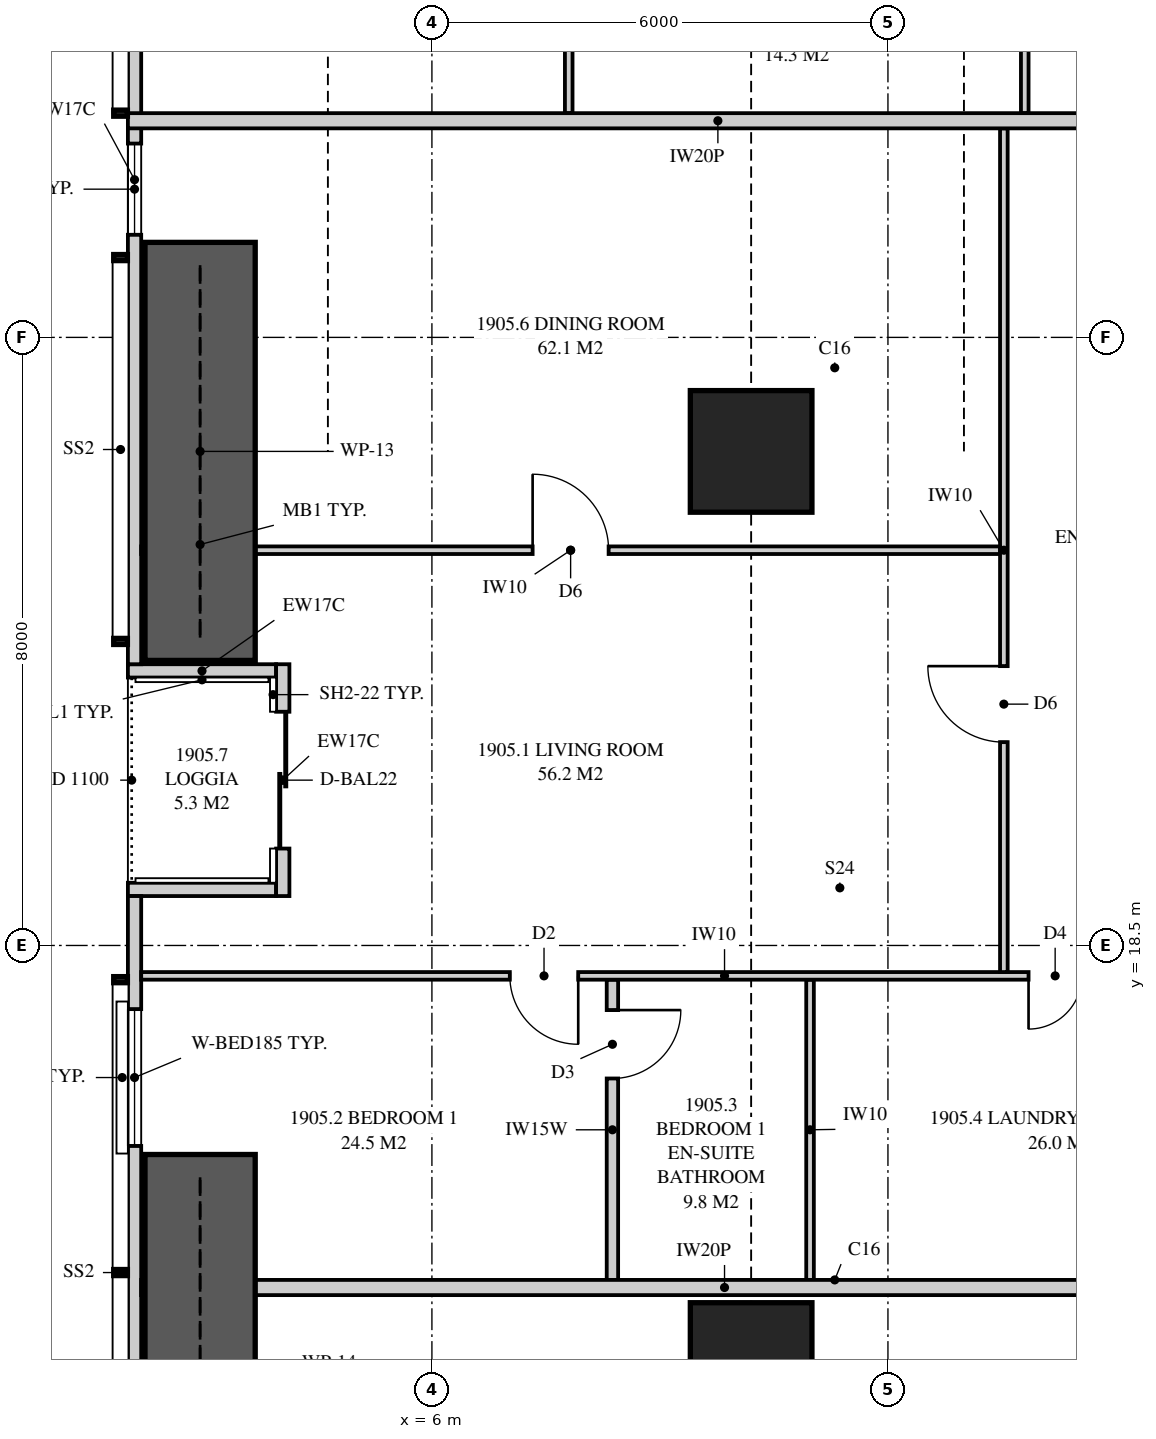
"""IFC4 building model, lengths in metres.
Left out: names, types, materials, properties, quantities, classifications, styles, units other than length and angle.
Written with IfcOpenShell. Run it as: python <this file> out.ifc"""

import sys

from ifc_helpers import new_model, si_unit, direction, frame, frame_2d, origin, origin_2d, place, context, subcontext, project, spatial, polyline, rectangle, outline, extrude, element, fill, save


model = new_model("IFC4")
c1 = context("Model", 3, precision=1e-05, world=origin(), true_north=direction((0.0, 1.0)))
c2 = subcontext(c1, "Body", "Model", "MODEL_VIEW")
j1 = project(units=[si_unit("LENGTHUNIT", "METRE"), si_unit("PLANEANGLEUNIT", "RADIAN")], contexts=[c1])
p1 = place(None, origin())
s1 = spatial("IfcSite", under=j1, at=p1, CompositionType="ELEMENT")
p2 = place(p1, origin())
s2 = spatial("IfcBuilding", under=s1, at=p2, CompositionType="ELEMENT")
p3 = place(p2, frame((0.0, 0.0, 71.25)))
s3 = spatial("IfcBuildingStorey", under=s2, at=p3, CompositionType="ELEMENT", Elevation=71.25)
for number, where, z_axis, x_axis in (
    (1, (10.2, 13.0, 0.0), (0.0, 0.0, 1.0), (1.0, 0.0, 0.0)),
    (2, (10.2, 25.0, 0.0), (0.0, 0.0, 1.0), (1.0, 0.0, 0.0)),
):
    element("IfcColumn", number, at=place(p3, frame(where, z_axis=z_axis, x_axis=x_axis)), inside=s3, PredefinedType="COLUMN", context=c2, shape_type="SweptSolid", body=[
        extrude(rectangle(XDim=1.6, YDim=1.6, at=origin_2d()), origin(), (0.0, 0.0, 1.0), 3.5),
    ])
p4 = place(p3, frame((2.087, 34.949, 0.0), z_axis=(0.0, 0.0, 1.0), x_axis=(0.0, -1.0, 0.0)))
e3 = element("IfcWall", 3, at=p4, inside=s3, PredefinedType="SOLIDWALL", context=c2, shape_type="SweptSolid", body=[
    extrude(rectangle(XDim=12.749, YDim=0.175, at=frame_2d((6.375, 0.0))), origin(), (0.0, 0.0, 1.0), 3.22),
])
p5 = place(p4, frame((2.704, 0.0, 0.4)))
e4 = element("IfcOpeningElement", 4, at=p5, cuts=e3, PredefinedType="OPENING", context=c2, shape_type="SweptSolid", body=[
    extrude(rectangle(XDim=1.8, YDim=1.85, at=frame_2d((0.9, 0.925))), frame((0.0, 0.097, 0.0), z_axis=(0.0, -1.0, 0.0), x_axis=(1.0, 0.0, 0.0)), (0.0, 0.0, 1.0), 0.195),
])
p6 = place(p4, frame((5.899, 0.0, 0.4)))
e5 = element("IfcOpeningElement", 5, at=p6, cuts=e3, PredefinedType="OPENING", context=c2, shape_type="SweptSolid", body=[
    extrude(rectangle(XDim=1.2, YDim=1.85, at=frame_2d((0.6, 0.925))), frame((0.0, 0.097, 0.0), z_axis=(0.0, -1.0, 0.0), x_axis=(1.0, 0.0, 0.0)), (0.0, 0.0, 1.0), 0.195),
])
p7 = place(p3, frame((2.087, 19.15, 0.0), z_axis=(0.0, 0.0, 1.0), x_axis=(0.0, -1.0, 0.0)))
e6 = element("IfcWall", 6, at=p7, inside=s3, PredefinedType="SOLIDWALL", context=c2, shape_type="SweptSolid", body=[
    extrude(rectangle(XDim=16.099, YDim=0.175, at=frame_2d((8.049, 0.0))), origin(), (0.0, 0.0, 1.0), 3.22),
])
p8 = place(p7, frame((1.488, 0.0, 0.4)))
e7 = element("IfcOpeningElement", 7, at=p8, cuts=e6, PredefinedType="OPENING", context=c2, shape_type="SweptSolid", body=[
    extrude(rectangle(XDim=1.8, YDim=1.85, at=frame_2d((0.9, 0.925))), frame((0.0, 0.097, 0.0), z_axis=(0.0, -1.0, 0.0), x_axis=(1.0, 0.0, 0.0)), (0.0, 0.0, 1.0), 0.195),
])
p9 = place(p7, frame((9.106, 0.0, 0.4)))
e8 = element("IfcOpeningElement", 8, at=p9, cuts=e6, PredefinedType="OPENING", context=c2, shape_type="SweptSolid", body=[
    extrude(rectangle(XDim=1.2, YDim=1.85, at=frame_2d((0.6, 0.925))), frame((0.0, 0.097, 0.0), z_axis=(0.0, -1.0, 0.0), x_axis=(1.0, 0.0, 0.0)), (0.0, 0.0, 1.0), 0.195),
])
p10 = place(p7, frame((12.094, 0.0, 0.4)))
e9 = element("IfcOpeningElement", 9, at=p10, cuts=e6, PredefinedType="OPENING", context=c2, shape_type="SweptSolid", body=[
    extrude(rectangle(XDim=1.8, YDim=1.85, at=frame_2d((0.9, 0.925))), frame((0.0, 0.097, 0.0), z_axis=(0.0, -1.0, 0.0), x_axis=(1.0, 0.0, 0.0)), (0.0, 0.0, 1.0), 0.195),
])
p11 = place(p3, frame((4.038, 22.2, 0.0), z_axis=(0.0, 0.0, 1.0), x_axis=(0.0, -1.0, 0.0)))
e10 = element("IfcWall", 10, at=p11, inside=s3, PredefinedType="SOLIDWALL", context=c2, shape_type="SweptSolid", body=[
    extrude(rectangle(XDim=3.05, YDim=0.175, at=frame_2d((1.525, 0.0))), origin(), (0.0, 0.0, 1.0), 2.765),
])
p12 = place(p11, frame((0.625, 0.0, 0.0)))
e11 = element("IfcOpeningElement", 11, at=p12, cuts=e10, PredefinedType="OPENING", context=c2, shape_type="SweptSolid", body=[
    extrude(rectangle(XDim=1.8, YDim=2.25, at=frame_2d((0.9, 1.125))), frame((0.0, 0.097, 0.0), z_axis=(0.0, -1.0, 0.0), x_axis=(1.0, 0.0, 0.0)), (0.0, 0.0, 1.0), 0.195),
])
p13 = place(p3, frame((2.0, 22.113, 0.0), z_axis=(0.0, 0.0, 1.0), x_axis=(1.0, 0.0, 0.0)))
e12 = element("IfcWall", 12, at=p13, inside=s3, PredefinedType="SOLIDWALL", context=c2, shape_type="SweptSolid", body=[
    extrude(outline(polyline([(0.0, 0.0), (1.95, 0.0), (1.95, 3.094), (1.65, 3.094), (1.65, 2.1), (0.25, 2.1), (0.25, 3.22), (0.0, 3.22), (0.0, 0.0)])), frame((0.0, 0.087, 0.0), z_axis=(0.0, -1.0, 0.0), x_axis=(1.0, 0.0, 0.0)), (0.0, 0.0, 1.0), 0.175),
])
p14 = place(p3, frame((2.0, 19.238, 0.0), z_axis=(0.0, 0.0, 1.0), x_axis=(1.0, 0.0, 0.0)))
e13 = element("IfcWall", 13, at=p14, inside=s3, PredefinedType="SOLIDWALL", context=c2, shape_type="SweptSolid", body=[
    extrude(outline(polyline([(0.0, 0.0), (1.95, 0.0), (1.95, 3.22), (1.65, 3.22), (1.65, 2.1), (0.25, 2.1), (0.25, 3.22), (0.0, 3.22), (0.0, 0.0)])), frame((0.0, 0.087, 0.0), z_axis=(0.0, -1.0, 0.0), x_axis=(1.0, 0.0, 0.0)), (0.0, 0.0, 1.0), 0.175),
])
p15 = place(p3, frame((7.8, 37.825, 0.0), z_axis=(0.0, 0.0, 1.0), x_axis=(0.0, -1.0, 0.0)))
e14 = element("IfcWall", 14, at=p15, inside=s3, PredefinedType="PARTITIONING", context=c2, shape_type="SweptSolid", body=[
    extrude(outline(polyline([(0.0, 0.0), (8.375, 0.0), (8.375, 3.22), (2.544, 3.22), (2.544, 2.1), (1.096, 2.1), (1.096, 3.22), (0.0, 3.22), (0.0, 0.0)])), frame((0.0, 0.05, 0.0), z_axis=(0.0, -1.0, 0.0), x_axis=(1.0, 0.0, 0.0)), (0.0, 0.0, 1.0), 0.1),
])
p16 = place(p15, frame((2.736, 0.0, 0.0)))
e15 = element("IfcOpeningElement", 15, at=p16, cuts=e14, PredefinedType="OPENING", context=c2, shape_type="SweptSolid", body=[
    extrude(rectangle(XDim=0.9, YDim=2.1, at=frame_2d((0.45, 1.05))), frame((0.0, 0.06, 0.0), z_axis=(0.0, -1.0, 0.0), x_axis=(1.0, 0.0, 0.0)), (0.0, 0.0, 1.0), 0.12),
])
p17 = place(p15, frame((6.006, 0.0, 0.0)))
e16 = element("IfcOpeningElement", 16, at=p17, cuts=e14, PredefinedType="OPENING", context=c2, shape_type="SweptSolid", body=[
    extrude(rectangle(XDim=0.9, YDim=2.1, at=frame_2d((0.45, 1.05))), frame((0.0, 0.06, 0.0), z_axis=(0.0, -1.0, 0.0), x_axis=(1.0, 0.0, 0.0)), (0.0, 0.0, 1.0), 0.12),
])
p18 = place(p3, frame((13.8, 37.825, 0.0), z_axis=(0.0, 0.0, 1.0), x_axis=(0.0, -1.0, 0.0)))
e17 = element("IfcWall", 17, at=p18, inside=s3, PredefinedType="PARTITIONING", context=c2, shape_type="SweptSolid", body=[
    extrude(outline(polyline([(8.375, 0.0), (8.375, 3.22), (2.446, 3.22), (2.446, 2.641), (1.485, 2.641), (1.485, 2.319), (1.475, 2.319), (1.475, 2.1), (1.021, 2.1), (1.021, 1.32), (0.529, 1.32), (0.529, 2.1), (0.075, 2.1), (0.075, 2.319), (0.0, 2.319), (0.0, 0.0), (8.375, 0.0)]), holes=[polyline([(0.529, 0.177), (0.529, 0.98), (1.021, 0.98), (1.021, 0.177), (0.529, 0.177)])]), frame((0.0, 0.05, 0.0), z_axis=(0.0, -1.0, 0.0), x_axis=(1.0, 0.0, 0.0)), (0.0, 0.0, 1.0), 0.1),
])
p19 = place(p18, frame((4.525, 0.0, 0.0)))
e18 = element("IfcOpeningElement", 18, at=p19, cuts=e17, PredefinedType="OPENING", context=c2, shape_type="SweptSolid", body=[
    extrude(rectangle(XDim=0.9, YDim=2.1, at=frame_2d((0.45, 1.05))), frame((0.0, 0.06, 0.0), z_axis=(0.0, -1.0, 0.0), x_axis=(1.0, 0.0, 0.0)), (0.0, 0.0, 1.0), 0.12),
])
p20 = place(p3, frame((2.0, 29.35, 0.0), z_axis=(0.0, 0.0, 1.0), x_axis=(1.0, 0.0, 0.0)))
e19 = element("IfcWall", 19, at=p20, inside=s3, PredefinedType="PARTITIONING", context=c2, shape_type="SweptSolid", body=[
    extrude(outline(polyline([(0.0, 0.0), (15.525, 0.0), (15.525, 3.22), (11.349, 3.22), (11.349, 2.621), (10.651, 2.621), (10.651, 3.22), (9.51, 3.22), (9.51, 2.62), (6.89, 2.62), (6.89, 3.22), (2.98, 3.22), (2.98, 2.621), (2.381, 2.621), (2.381, 2.1), (0.93, 2.1), (0.93, 3.22), (0.0, 3.22), (0.0, 0.0)])), frame((0.0, 0.1, 0.0), z_axis=(0.0, -1.0, 0.0), x_axis=(1.0, 0.0, 0.0)), (0.0, 0.0, 1.0), 0.2),
])
p21 = place(p3, frame((2.175, 14.0, 0.0), z_axis=(0.0, 0.0, 1.0), x_axis=(1.0, 0.0, 0.0)))
e20 = element("IfcWall", 20, at=p21, inside=s3, PredefinedType="PARTITIONING", context=c2, shape_type="SweptSolid", body=[
    extrude(outline(polyline([(0.075, 3.22), (0.0, 3.22), (0.0, 0.0), (0.529, 0.0), (0.529, 0.873), (1.021, 0.873), (1.021, 0.0), (15.35, 0.0), (15.35, 3.22), (9.335, 3.22), (9.335, 2.62), (6.715, 2.62), (6.715, 3.22), (1.475, 3.22), (1.475, 2.1), (1.021, 2.1), (1.021, 1.427), (0.529, 1.427), (0.529, 2.1), (0.075, 2.1), (0.075, 3.22)])), frame((0.0, 0.1, 0.0), z_axis=(0.0, -1.0, 0.0), x_axis=(1.0, 0.0, 0.0)), (0.0, 0.0, 1.0), 0.2),
])
p22 = place(p3, frame((2.175, 18.1, 0.0), z_axis=(0.0, 0.0, 1.0), x_axis=(1.0, 0.0, 0.0)))
e21 = element("IfcWall", 21, at=p22, inside=s3, PredefinedType="PARTITIONING", context=c2, shape_type="SweptSolid", body=[
    extrude(outline(polyline([(0.0, 0.0), (15.35, 0.0), (15.35, 3.22), (9.285, 3.22), (9.285, 2.62), (6.765, 2.62), (6.765, 3.22), (1.475, 3.22), (1.475, 2.1), (0.075, 2.1), (0.075, 3.22), (0.0, 3.22), (0.0, 0.0)])), frame((0.0, 0.05, 0.0), z_axis=(0.0, -1.0, 0.0), x_axis=(1.0, 0.0, 0.0)), (0.0, 0.0, 1.0), 0.1),
])
p23 = place(p22, frame((4.85, 0.0, 0.0)))
e22 = element("IfcOpeningElement", 22, at=p23, cuts=e21, PredefinedType="OPENING", context=c2, shape_type="SweptSolid", body=[
    extrude(rectangle(XDim=0.9, YDim=2.1, at=frame_2d((0.45, 1.05))), frame((0.0, 0.06, 0.0), z_axis=(0.0, -1.0, 0.0), x_axis=(1.0, 0.0, 0.0)), (0.0, 0.0, 1.0), 0.12),
])
p24 = place(p22, frame((11.675, 0.0, 0.0)))
e23 = element("IfcOpeningElement", 23, at=p24, cuts=e21, PredefinedType="OPENING", context=c2, shape_type="SweptSolid", body=[
    extrude(rectangle(XDim=0.7, YDim=2.1, at=frame_2d((0.35, 1.05))), frame((0.0, 0.06, 0.0), z_axis=(0.0, -1.0, 0.0), x_axis=(1.0, 0.0, 0.0)), (0.0, 0.0, 1.0), 0.12),
])
p25 = place(p3, frame((8.375, 14.1, 0.0), z_axis=(0.0, 0.0, 1.0), x_axis=(0.0, 1.0, 0.0)))
e24 = element("IfcWall", 24, at=p25, inside=s3, PredefinedType="PLUMBINGWALL", context=c2, shape_type="SweptSolid", body=[
    extrude(rectangle(XDim=3.95, YDim=0.15, at=frame_2d((1.975, 0.0))), origin(), (0.0, 0.0, 1.0), 3.22),
])
p26 = place(p25, frame((2.65, 0.0, 0.0)))
e25 = element("IfcOpeningElement", 25, at=p26, cuts=e24, PredefinedType="OPENING", context=c2, shape_type="SweptSolid", body=[
    extrude(rectangle(XDim=0.9, YDim=2.1, at=frame_2d((0.45, 1.05))), frame((0.0, 0.085, 0.0), z_axis=(0.0, -1.0, 0.0), x_axis=(1.0, 0.0, 0.0)), (0.0, 0.0, 1.0), 0.17),
])
p27 = place(p3, frame((10.975, 14.1, 0.0), z_axis=(0.0, 0.0, 1.0), x_axis=(0.0, 1.0, 0.0)))
e26 = element("IfcWall", 26, at=p27, inside=s3, PredefinedType="PARTITIONING", context=c2, shape_type="SweptSolid", body=[
    extrude(outline(polyline([(0.0, 0.0), (3.95, 0.0), (3.95, 3.22), (3.95, 2.62), (0.0, 2.62), (0.0, 3.22), (0.0, 0.0)])), frame((0.0, 0.05, 0.0), z_axis=(0.0, -1.0, 0.0), x_axis=(1.0, 0.0, 0.0)), (0.0, 0.0, 1.0), 0.1),
])
p28 = place(p3, frame((13.525, 18.15, 0.0), z_axis=(0.0, 0.0, 1.0), x_axis=(0.0, 1.0, 0.0)))
e27 = element("IfcWall", 27, at=p28, inside=s3, PredefinedType="PARTITIONING", context=c2, shape_type="SweptSolid", body=[
    extrude(outline(polyline([(0.0, 0.0), (11.1, 0.0), (11.1, 3.22), (7.35, 3.22), (7.35, 2.22), (6.35, 2.22), (6.35, 3.22), (0.0, 3.22), (0.0, 0.0)])), frame((0.0, 0.05, 0.0), z_axis=(0.0, -1.0, 0.0), x_axis=(1.0, 0.0, 0.0)), (0.0, 0.0, 1.0), 0.1),
])
p29 = place(p28, frame((3.025, 0.0, 0.0)))
e28 = element("IfcOpeningElement", 28, at=p29, cuts=e27, PredefinedType="OPENING", context=c2, shape_type="SweptSolid", body=[
    extrude(rectangle(XDim=1.0, YDim=2.1, at=frame_2d((0.5, 1.05))), frame((0.0, 0.06, 0.0), z_axis=(0.0, -1.0, 0.0), x_axis=(1.0, 0.0, 0.0)), (0.0, 0.0, 1.0), 0.12),
])
p30 = place(p3, frame((2.175, 23.7, 0.0), z_axis=(0.0, 0.0, 1.0), x_axis=(1.0, 0.0, 0.0)))
e29 = element("IfcWall", 29, at=p30, inside=s3, PredefinedType="PARTITIONING", context=c2, shape_type="SweptSolid", body=[
    extrude(outline(polyline([(0.075, 3.22), (0.0, 3.22), (0.0, 0.0), (0.529, 0.0), (0.529, 0.623), (1.021, 0.623), (1.021, 0.0), (11.3, 0.0), (11.3, 3.22), (9.285, 3.22), (9.285, 2.62), (6.765, 2.62), (6.765, 3.22), (1.72, 3.22), (1.72, 2.623), (1.7, 2.576), (1.475, 2.562), (1.475, 2.1), (1.021, 2.1), (1.021, 1.677), (0.529, 1.677), (0.529, 2.1), (0.075, 2.1), (0.075, 3.22)])), frame((0.0, 0.05, 0.0), z_axis=(0.0, -1.0, 0.0), x_axis=(1.0, 0.0, 0.0)), (0.0, 0.0, 1.0), 0.1),
])
p31 = place(p30, frame((5.15, 0.0, 0.0)))
e30 = element("IfcOpeningElement", 30, at=p31, cuts=e29, PredefinedType="OPENING", context=c2, shape_type="SweptSolid", body=[
    extrude(rectangle(XDim=1.0, YDim=2.1, at=frame_2d((0.5, 1.05))), frame((0.0, 0.06, 0.0), z_axis=(0.0, -1.0, 0.0), x_axis=(1.0, 0.0, 0.0)), (0.0, 0.0, 1.0), 0.12),
])
for number, where, z_axis, x_axis in (
    (31, (2.95, 22.25, 0.0), (0.0, 0.0, 1.0), (0.0, 1.0, 0.0)),
    (32, (2.95, 10.25, 0.0), (0.0, 0.0, 1.0), (0.0, 1.0, 0.0)),
):
    element("IfcWall", number, at=place(p3, frame(where, z_axis=z_axis, x_axis=x_axis)), inside=s3, PredefinedType="SHEAR", context=c2, shape_type="SweptSolid", body=[
        extrude(rectangle(XDim=5.5, YDim=1.45, at=frame_2d((2.75, 0.0))), origin(), (0.0, 0.0, 1.0), 3.5),
    ])
p32 = place(p6, origin())
e33 = element("IfcWindow", 33, at=p32, inside=s3, PartitioningType="SINGLE_PANEL", PredefinedType="WINDOW", context=c2, shape_type="SweptSolid", body=[
    extrude(rectangle(XDim=1.2, YDim=1.85, at=frame_2d((0.6, 0.925))), frame((0.0, 0.03, 0.0), z_axis=(0.0, -1.0, 0.0), x_axis=(1.0, 0.0, 0.0)), (0.0, 0.0, 1.0), 0.06),
])
fill(e5, e33)
p33 = place(p12, origin())
e34 = element("IfcDoor", 34, at=p33, inside=s3, OperationType="SLIDING_TO_LEFT", PredefinedType="DOOR", context=c2, shape_type="SweptSolid", body=[
    extrude(rectangle(XDim=1.8, YDim=2.25, at=frame_2d((0.9, 1.125))), frame((0.0, 0.025, 0.0), z_axis=(0.0, -1.0, 0.0), x_axis=(1.0, 0.0, 0.0)), (0.0, 0.0, 1.0), 0.05),
])
fill(e11, e34)
p34 = place(p8, origin())
e35 = element("IfcWindow", 35, at=p34, inside=s3, PartitioningType="SINGLE_PANEL", PredefinedType="WINDOW", context=c2, shape_type="SweptSolid", body=[
    extrude(rectangle(XDim=1.8, YDim=1.85, at=frame_2d((0.9, 0.925))), frame((0.0, 0.03, 0.0), z_axis=(0.0, -1.0, 0.0), x_axis=(1.0, 0.0, 0.0)), (0.0, 0.0, 1.0), 0.06),
])
fill(e7, e35)
p35 = place(p23, frame((0.9, 0.0, 0.0), z_axis=(0.0, 0.0, 1.0), x_axis=(-1.0, 0.0, 0.0)))
e36 = element("IfcDoor", 36, at=p35, inside=s3, OperationType="SINGLE_SWING_LEFT", PredefinedType="DOOR", context=c2, shape_type="SweptSolid", body=[
    extrude(rectangle(XDim=0.9, YDim=2.1, at=frame_2d((0.45, 1.05))), frame((0.0, 0.025, 0.0), z_axis=(0.0, -1.0, 0.0), x_axis=(1.0, 0.0, 0.0)), (0.0, 0.0, 1.0), 0.05),
])
fill(e22, e36)
p36 = place(p26, frame((0.9, 0.0, 0.0), z_axis=(0.0, 0.0, 1.0), x_axis=(-1.0, 0.0, 0.0)))
e37 = element("IfcDoor", 37, at=p36, inside=s3, OperationType="SINGLE_SWING_LEFT", PredefinedType="DOOR", context=c2, shape_type="SweptSolid", body=[
    extrude(rectangle(XDim=0.9, YDim=2.1, at=frame_2d((0.45, 1.05))), frame((0.0, 0.025, 0.0), z_axis=(0.0, -1.0, 0.0), x_axis=(1.0, 0.0, 0.0)), (0.0, 0.0, 1.0), 0.05),
])
fill(e25, e37)
p37 = place(p24, frame((0.7, 0.0, 0.0), z_axis=(0.0, 0.0, 1.0), x_axis=(-1.0, 0.0, 0.0)))
e38 = element("IfcDoor", 38, at=p37, inside=s3, OperationType="SINGLE_SWING_RIGHT", PredefinedType="DOOR", context=c2, shape_type="SweptSolid", body=[
    extrude(rectangle(XDim=0.7, YDim=2.1, at=frame_2d((0.35, 1.05))), frame((0.0, 0.025, 0.0), z_axis=(0.0, -1.0, 0.0), x_axis=(1.0, 0.0, 0.0)), (0.0, 0.0, 1.0), 0.05),
])
fill(e23, e38)
p38 = place(p29, origin())
e39 = element("IfcDoor", 39, at=p38, inside=s3, OperationType="SINGLE_SWING_RIGHT", PredefinedType="DOOR", context=c2, shape_type="SweptSolid", body=[
    extrude(rectangle(XDim=1.0, YDim=2.1, at=frame_2d((0.5, 1.05))), frame((0.0, 0.025, 0.0), z_axis=(0.0, -1.0, 0.0), x_axis=(1.0, 0.0, 0.0)), (0.0, 0.0, 1.0), 0.05),
])
fill(e28, e39)
p39 = place(p31, origin())
e40 = element("IfcDoor", 40, at=p39, inside=s3, OperationType="SINGLE_SWING_LEFT", PredefinedType="DOOR", context=c2, shape_type="SweptSolid", body=[
    extrude(rectangle(XDim=1.0, YDim=2.1, at=frame_2d((0.5, 1.05))), frame((0.0, 0.025, 0.0), z_axis=(0.0, -1.0, 0.0), x_axis=(1.0, 0.0, 0.0)), (0.0, 0.0, 1.0), 0.05),
])
fill(e30, e40)
save(model, sys.argv[1])
